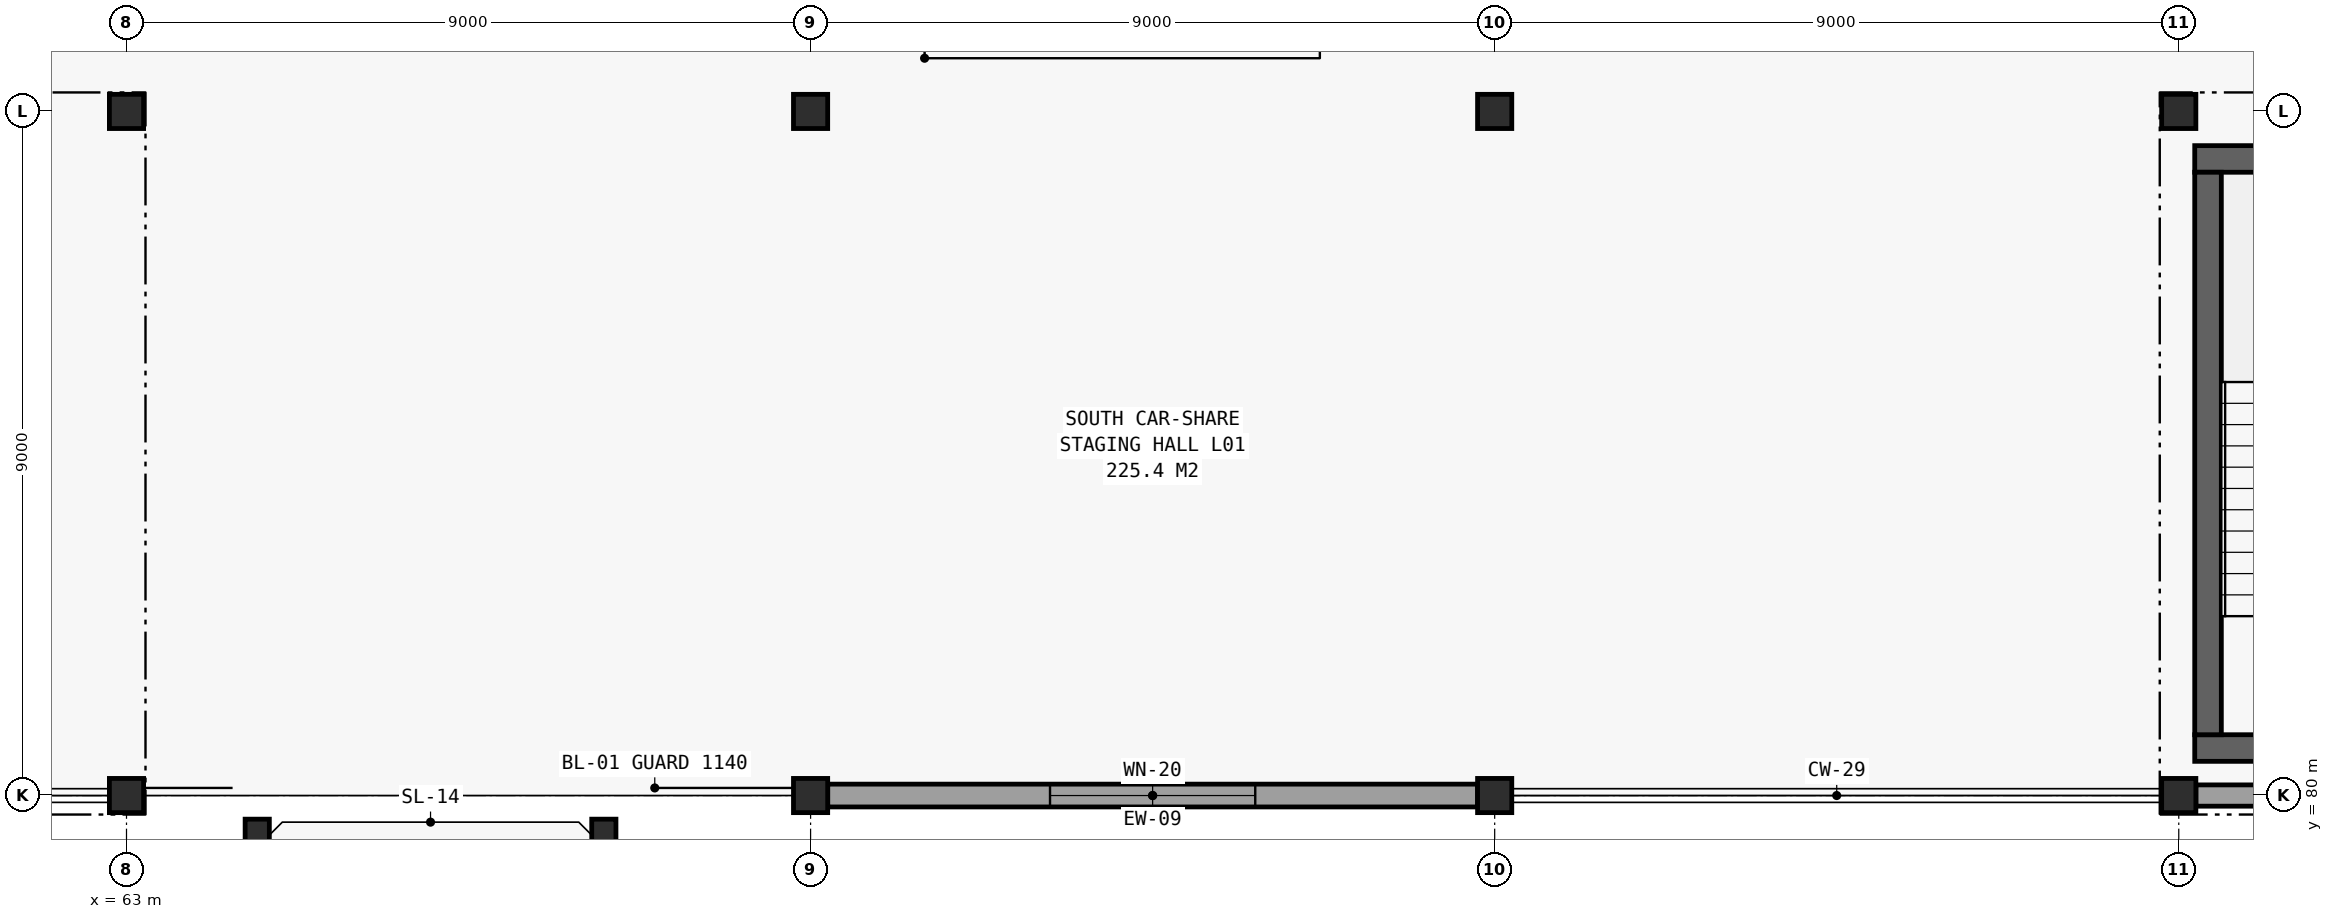
"""IFC4 building model, lengths in metres.
Left out: names, types, materials, properties, quantities, classifications, styles, units other than length and angle.
Written with IfcOpenShell. Run it as: python <this file> out.ifc"""

import sys

from ifc_helpers import new_model, si_unit, direction, frame, frame_2d, origin, origin_2d, place, context, subcontext, project, spatial, rectangle, hollow_rectangle, hollow_circle, extrude, element, fill, save


model = new_model("IFC4")
c1 = context("Model", 3, precision=1e-05, world=origin(), true_north=direction((0.0, 1.0)))
c2 = subcontext(c1, "Body", "Model", "MODEL_VIEW")
j1 = project(units=[si_unit("LENGTHUNIT", "METRE"), si_unit("PLANEANGLEUNIT", "RADIAN")], contexts=[c1])
p1 = place(None, origin())
s1 = spatial("IfcSite", under=j1, at=p1, CompositionType="ELEMENT")
p2 = place(p1, origin())
s2 = spatial("IfcBuilding", under=s1, at=p2, CompositionType="ELEMENT")
p3 = place(p2, frame((0.0, 0.0, 5.1)))
s3 = spatial("IfcBuildingStorey", under=s2, at=p3, CompositionType="ELEMENT", Elevation=5.1)
for number, where, z_axis, x_axis in (
    (1, (63.0, 80.0, 0.0), (0.0, 0.0, 1.0), (1.0, 0.0, 0.0)),
    (2, (63.0, 89.0, 0.0), (0.0, 0.0, 1.0), (1.0, 0.0, 0.0)),
):
    element("IfcColumn", number, at=place(p3, frame(where, z_axis=z_axis, x_axis=x_axis)), inside=s3, PredefinedType="COLUMN", context=c2, shape_type="SweptSolid", body=[
        extrude(hollow_rectangle(XDim=0.45, YDim=0.45, WallThickness=0.022, at=origin_2d()), origin(), (0.0, 0.0, 1.0), 4.2),
    ])
for number, where, z_axis, x_axis in (
    (3, (64.72, 79.53, 0.0), (0.0, 0.0, 1.0), (1.0, 0.0, 0.0)),
    (4, (69.28, 79.53, 0.0), (0.0, 0.0, 1.0), (1.0, 0.0, 0.0)),
):
    element("IfcColumn", number, at=place(p3, frame(where, z_axis=z_axis, x_axis=x_axis)), inside=s3, PredefinedType="COLUMN", context=c2, shape_type="SweptSolid", body=[
        extrude(hollow_circle(Radius=0.159, WallThickness=0.01, at=origin_2d()), origin(), (0.0, 0.0, 1.0), 4.06),
    ])
for number, where, z_axis, x_axis in (
    (5, (72.0, 80.0, 0.0), (0.0, 0.0, 1.0), (1.0, 0.0, 0.0)),
    (6, (72.0, 89.0, 0.0), (0.0, 0.0, 1.0), (1.0, 0.0, 0.0)),
    (7, (81.0, 80.0, 0.0), (0.0, 0.0, 1.0), (1.0, 0.0, 0.0)),
    (8, (81.0, 89.0, 0.0), (0.0, 0.0, 1.0), (1.0, 0.0, 0.0)),
    (9, (90.0, 80.0, 0.0), (0.0, 0.0, 1.0), (1.0, 0.0, 0.0)),
    (10, (90.0, 89.0, 0.0), (0.0, 0.0, 1.0), (1.0, 0.0, 0.0)),
):
    element("IfcColumn", number, at=place(p3, frame(where, z_axis=z_axis, x_axis=x_axis)), inside=s3, PredefinedType="COLUMN", context=c2, shape_type="SweptSolid", body=[
        extrude(hollow_rectangle(XDim=0.45, YDim=0.45, WallThickness=0.022, at=origin_2d()), origin(), (0.0, 0.0, 1.0), 4.2),
    ])
p4 = place(p3, frame((72.225, 80.0, 0.0), z_axis=(0.0, 0.0, 1.0), x_axis=(1.0, 0.0, 0.0)))
e11 = element("IfcWall", 11, at=p4, inside=s3, PredefinedType="SOLIDWALL", context=c2, shape_type="SweptSolid", body=[
    extrude(rectangle(XDim=8.55, YDim=0.3, at=frame_2d((4.275, 0.0))), origin(), (0.0, 0.0, 1.0), 3.352),
])
p5 = place(p4, frame((2.925, 0.0, 0.95)))
e12 = element("IfcOpeningElement", 12, at=p5, cuts=e11, PredefinedType="OPENING", context=c2, shape_type="SweptSolid", body=[
    extrude(rectangle(XDim=2.7, YDim=1.4, at=frame_2d((1.35, 0.7))), frame((0.0, 0.161, 0.0), z_axis=(0.0, -1.0, 0.0), x_axis=(1.0, 0.0, 0.0)), (0.0, 0.0, 1.0), 0.322),
])
p6 = place(p3, frame((90.225, 80.0, 0.0), z_axis=(0.0, 0.0, 1.0), x_axis=(1.0, 0.0, 0.0)))
e13 = element("IfcWall", 13, at=p6, inside=s3, PredefinedType="SOLIDWALL", context=c2, shape_type="SweptSolid", body=[
    extrude(rectangle(XDim=8.55, YDim=0.28, at=frame_2d((4.275, 0.0))), origin(), (0.0, 0.0, 1.0), 3.352),
])
p7 = place(p6, frame((3.075, 0.0, 0.95)))
e14 = element("IfcOpeningElement", 14, at=p7, cuts=e13, PredefinedType="OPENING", context=c2, shape_type="SweptSolid", body=[
    extrude(rectangle(XDim=2.4, YDim=1.3, at=frame_2d((1.2, 0.65))), frame((0.0, 0.151, 0.0), z_axis=(0.0, -1.0, 0.0), x_axis=(1.0, 0.0, 0.0)), (0.0, 0.0, 1.0), 0.302),
])
for number, where, z_axis, x_axis in (
    (15, (90.21, 80.625, 0.0), (0.0, 0.0, 1.0), (1.0, 0.0, 0.0)),
    (16, (90.21, 88.375, 0.0), (0.0, 0.0, 1.0), (1.0, 0.0, 0.0)),
):
    element("IfcWall", number, at=place(p3, frame(where, z_axis=z_axis, x_axis=x_axis)), inside=s3, PredefinedType="SHEAR", context=c2, shape_type="SweptSolid", body=[
        extrude(rectangle(XDim=3.98, YDim=0.35, at=frame_2d((1.99, 0.0))), origin(), (0.0, 0.0, 1.0), 3.94),
    ])
p8 = place(p3, frame((90.385, 80.8, 0.0), z_axis=(0.0, 0.0, 1.0), x_axis=(0.0, 1.0, 0.0)))
e17 = element("IfcWall", 17, at=p8, inside=s3, PredefinedType="SHEAR", context=c2, shape_type="SweptSolid", body=[
    extrude(rectangle(XDim=7.4, YDim=0.35, at=frame_2d((3.7, 0.0))), origin(), (0.0, 0.0, 1.0), 3.94),
])
p9 = place(p5, origin())
e18 = element("IfcWindow", 18, at=p9, inside=s3, PartitioningType="SINGLE_PANEL", PredefinedType="WINDOW", context=c2, shape_type="SweptSolid", body=[
    extrude(rectangle(XDim=2.7, YDim=1.4, at=frame_2d((1.35, 0.7))), frame((0.0, 0.03, 0.0), z_axis=(0.0, -1.0, 0.0), x_axis=(1.0, 0.0, 0.0)), (0.0, 0.0, 1.0), 0.06),
])
fill(e12, e18)
save(model, sys.argv[1])
